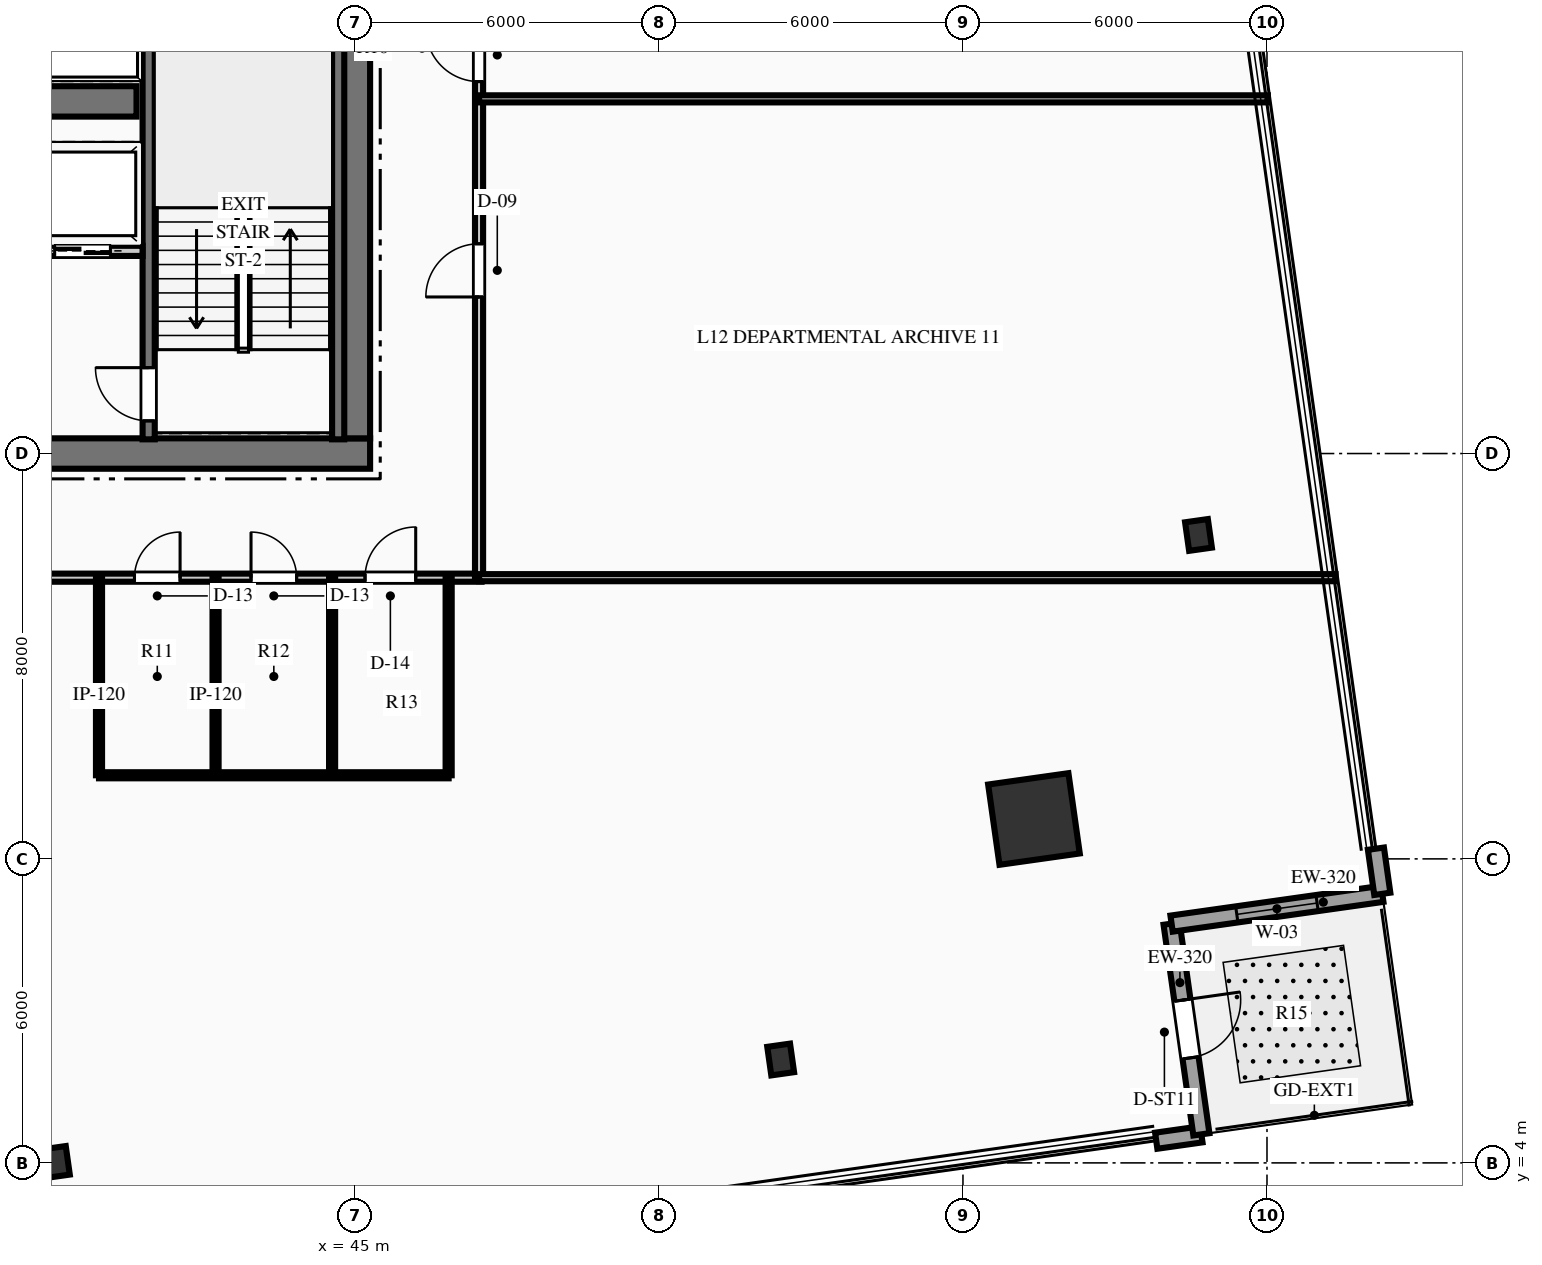
"""IFC4 building model, lengths in metres.
Left out: names, types, materials, properties, quantities, classifications, styles, units other than length and angle.
Written with IfcOpenShell. Run it as: python <this file> out.ifc"""

import sys

from ifc_helpers import new_model, si_unit, direction, frame, frame_2d, origin, origin_2d, place, context, subcontext, project, spatial, rectangle, hollow_rectangle, i_section, extrude, element, fill, save


model = new_model("IFC4")
c1 = context("Model", 3, precision=1e-05, world=origin(), true_north=direction((0.0, 1.0)))
c2 = subcontext(c1, "Body", "Model", "MODEL_VIEW")
j1 = project(units=[si_unit("LENGTHUNIT", "METRE"), si_unit("PLANEANGLEUNIT", "RADIAN")], contexts=[c1])
p1 = place(None, origin())
s1 = spatial("IfcSite", under=j1, at=p1, CompositionType="ELEMENT")
p2 = place(p1, origin())
s2 = spatial("IfcBuilding", under=s1, at=p2, CompositionType="ELEMENT")
p3 = place(p2, frame((0.0, 0.0, 55.2)))
s3 = spatial("IfcBuildingStorey", under=s2, at=p3, CompositionType="ELEMENT", Elevation=55.2)
p4 = place(p3, frame((26.7, 18.0, 0.0), z_axis=(0.0, 0.0, 1.0), x_axis=(1.0, 0.0, 0.0)))
e1 = element("IfcWall", 1, at=p4, inside=s3, PredefinedType="SHEAR", context=c2, shape_type="SweptSolid", body=[
    extrude(rectangle(XDim=18.6, YDim=0.6, at=frame_2d((9.3, 0.0))), origin(), (0.0, 0.0, 1.0), 3.75),
])
p5 = place(p4, frame((7.4, 0.0, 0.0)))
e2 = element("IfcOpeningElement", 2, at=p5, cuts=e1, PredefinedType="OPENING", context=c2, shape_type="SweptSolid", body=[
    extrude(rectangle(XDim=1.1, YDim=2.15, at=frame_2d((0.55, 1.075))), frame((0.0, 0.31, 0.0), z_axis=(0.0, -1.0, 0.0), x_axis=(1.0, 0.0, 0.0)), (0.0, 0.0, 1.0), 0.62),
])
p6 = place(p4, frame((10.1, 0.0, 0.0)))
e3 = element("IfcOpeningElement", 3, at=p6, cuts=e1, PredefinedType="OPENING", context=c2, shape_type="SweptSolid", body=[
    extrude(rectangle(XDim=1.1, YDim=2.15, at=frame_2d((0.55, 1.075))), frame((0.0, 0.31, 0.0), z_axis=(0.0, -1.0, 0.0), x_axis=(1.0, 0.0, 0.0)), (0.0, 0.0, 1.0), 0.62),
])
p7 = place(p3, frame((45.0, 18.3, 0.0), z_axis=(0.0, 0.0, 1.0), x_axis=(0.0, 1.0, 0.0)))
e4 = element("IfcWall", 4, at=p7, inside=s3, PredefinedType="SHEAR", context=c2, shape_type="SweptSolid", body=[
    extrude(rectangle(XDim=15.4, YDim=0.6, at=frame_2d((7.7, 0.0))), origin(), (0.0, 0.0, 1.0), 3.75),
])
p8 = place(p7, frame((9.94, 0.0, 0.0)))
e5 = element("IfcOpeningElement", 5, at=p8, cuts=e4, PredefinedType="OPENING", context=c2, shape_type="SweptSolid", body=[
    extrude(rectangle(XDim=1.4, YDim=2.2, at=frame_2d((0.7, 1.1))), frame((0.0, 0.31, 0.0), z_axis=(0.0, -1.0, 0.0), x_axis=(1.0, 0.0, 0.0)), (0.0, 0.0, 1.0), 0.62),
])
p9 = place(p3, frame((31.31, 24.95, 0.0), z_axis=(0.0, 0.0, 1.0), x_axis=(1.0, 0.0, 0.0)))
e6 = element("IfcWall", 6, at=p9, inside=s3, PredefinedType="SHEAR", context=c2, shape_type="SweptSolid", body=[
    extrude(rectangle(XDim=9.38, YDim=0.6, at=frame_2d((4.69, 0.0))), origin(), (0.0, 0.0, 1.0), 3.75),
])
p10 = place(p3, frame((40.93, 18.28, 0.0), z_axis=(0.0, 0.0, 1.0), x_axis=(0.0, 1.0, 0.0)))
e7 = element("IfcWall", 7, at=p10, inside=s3, PredefinedType="SHEAR", context=c2, shape_type="SweptSolid", body=[
    extrude(rectangle(XDim=8.26, YDim=0.24, at=frame_2d((4.13, 0.0))), origin(), (0.0, 0.0, 1.0), 3.75),
])
p11 = place(p10, frame((0.365, 0.0, 0.0)))
e8 = element("IfcOpeningElement", 8, at=p11, cuts=e7, PredefinedType="OPENING", context=c2, shape_type="SweptSolid", body=[
    extrude(rectangle(XDim=1.05, YDim=2.15, at=frame_2d((0.525, 1.075))), frame((0.0, 0.13, 0.0), z_axis=(0.0, -1.0, 0.0), x_axis=(1.0, 0.0, 0.0)), (0.0, 0.0, 1.0), 0.26),
])
p12 = place(p3, frame((44.67, 18.28, 0.0), z_axis=(0.0, 0.0, 1.0), x_axis=(0.0, 1.0, 0.0)))
e9 = element("IfcWall", 9, at=p12, inside=s3, PredefinedType="SHEAR", context=c2, shape_type="SweptSolid", body=[
    extrude(rectangle(XDim=8.26, YDim=0.24, at=frame_2d((4.13, 0.0))), origin(), (0.0, 0.0, 1.0), 3.75),
])
p13 = place(p3, frame((58.401, 10.787, 0.0), z_axis=(0.0, 0.0, 1.0), x_axis=(0.990146240249, 0.140037219771, 0.0)))
e10 = element("IfcColumn", 10, at=p13, inside=s3, PredefinedType="COLUMN", context=c2, shape_type="SweptSolid", body=[
    extrude(hollow_rectangle(XDim=1.6, YDim=1.6, WallThickness=0.08, at=origin_2d()), origin(), (0.0, 0.0, 1.0), 3.75),
])
for number, where, z_axis, x_axis in (
    (11, (39.109, 4.019, 0.0), (0.0, 0.0, 1.0), (0.99, 0.14, 0.0)),
    (12, (53.403, 6.04, 0.0), (0.0, 0.0, 1.0), (0.99, 0.14, 0.0)),
    (13, (61.648, 16.393, 0.0), (0.0, 0.0, 1.0), (0.99, 0.14, 0.0)),
):
    element("IfcColumn", number, at=place(p3, frame(where, z_axis=z_axis, x_axis=x_axis)), inside=s3, PredefinedType="COLUMN", context=c2, shape_type="SweptSolid", body=[
        extrude(i_section(OverallWidth=0.454, OverallDepth=0.569, WebThickness=0.078, FlangeThickness=0.125, at=origin_2d()), origin(), (0.0, 0.0, 1.0), 3.75),
    ])
p14 = place(p3, frame((61.705, 4.563, 0.0), z_axis=(0.0, 0.0, 1.0), x_axis=(-0.990149293409, -0.140015630419, 0.0)))
e14 = element("IfcWall", 14, at=p14, inside=s3, PredefinedType="STANDARD", context=c2, shape_type="SweptSolid", body=[
    extrude(rectangle(XDim=0.9, YDim=0.32, at=frame_2d((0.45, 0.0))), origin(), (0.0, 0.0, 1.0), 3.44),
])
p15 = place(p3, frame((61.117, 8.722, 0.0), z_axis=(0.0, 0.0, 1.0), x_axis=(0.139972650661, -0.990155370165, 0.0)))
e15 = element("IfcWall", 15, at=p15, inside=s3, PredefinedType="STANDARD", context=c2, shape_type="SweptSolid", body=[
    extrude(rectangle(XDim=4.2, YDim=0.32, at=frame_2d((2.1, 0.0))), origin(), (0.0, 0.0, 1.0), 3.44),
])
p16 = place(p15, frame((1.525, 0.0, 0.0)))
e16 = element("IfcOpeningElement", 16, at=p16, cuts=e15, PredefinedType="OPENING", context=c2, shape_type="SweptSolid", body=[
    extrude(rectangle(XDim=1.15, YDim=2.2, at=frame_2d((0.575, 1.1))), frame((0.0, 0.17, 0.0), z_axis=(0.0, -1.0, 0.0), x_axis=(1.0, 0.0, 0.0)), (0.0, 0.0, 1.0), 0.34),
])
p17 = place(p3, frame((65.276, 9.31, 0.0), z_axis=(0.0, 0.0, 1.0), x_axis=(-0.990146172451, -0.140037699139, 0.0)))
e17 = element("IfcWall", 17, at=p17, inside=s3, PredefinedType="STANDARD", context=c2, shape_type="SweptSolid", body=[
    extrude(rectangle(XDim=4.2, YDim=0.32, at=frame_2d((2.1, 0.0))), origin(), (0.0, 0.0, 1.0), 3.44),
])
p18 = place(p17, frame((1.3, 0.0, 0.85)))
e18 = element("IfcOpeningElement", 18, at=p18, cuts=e17, PredefinedType="OPENING", context=c2, shape_type="SweptSolid", body=[
    extrude(rectangle(XDim=1.6, YDim=2.1, at=frame_2d((0.8, 1.05))), frame((0.0, 0.17, 0.0), z_axis=(0.0, -1.0, 0.0), x_axis=(1.0, 0.0, 0.0)), (0.0, 0.0, 1.0), 0.34),
])
p19 = place(p3, frame((65.15, 10.201, 0.0), z_axis=(0.0, 0.0, 1.0), x_axis=(0.139978021702, -0.990154610877, 0.0)))
e19 = element("IfcWall", 19, at=p19, inside=s3, PredefinedType="STANDARD", context=c2, shape_type="SweptSolid", body=[
    extrude(rectangle(XDim=0.9, YDim=0.32, at=frame_2d((0.45, 0.0))), origin(), (0.0, 0.0, 1.0), 3.44),
])
p20 = place(p3, frame((36.12, 22.0, 0.0), z_axis=(0.0, 0.0, 1.0), x_axis=(1.0, 0.0, 0.0)))
e20 = element("IfcWall", 20, at=p20, inside=s3, PredefinedType="PARTITIONING", context=c2, shape_type="SweptSolid", body=[
    extrude(rectangle(XDim=4.69, YDim=0.2, at=frame_2d((2.345, 0.0))), origin(), (0.0, 0.0, 1.0), 3.44),
])
p21 = place(p20, frame((2.955, 0.0, 0.0)))
e21 = element("IfcOpeningElement", 21, at=p21, cuts=e20, PredefinedType="OPENING", context=c2, shape_type="SweptSolid", body=[
    extrude(rectangle(XDim=1.1, YDim=2.15, at=frame_2d((0.55, 1.075))), frame((0.0, 0.11, 0.0), z_axis=(0.0, -1.0, 0.0), x_axis=(1.0, 0.0, 0.0)), (0.0, 0.0, 1.0), 0.22),
])
p22 = place(p20, frame((0.08, 0.0, 0.0)))
e22 = element("IfcOpeningElement", 22, at=p22, cuts=e20, PredefinedType="OPENING", context=c2, shape_type="SweptSolid", body=[
    extrude(rectangle(XDim=1.4, YDim=2.2, at=frame_2d((0.7, 1.1))), frame((0.0, 0.11, 0.0), z_axis=(0.0, -1.0, 0.0), x_axis=(1.0, 0.0, 0.0)), (0.0, 0.0, 1.0), 0.22),
])
p23 = place(p3, frame((24.5, 15.55, 0.0), z_axis=(0.0, 0.0, 1.0), x_axis=(1.0, 0.0, 0.0)))
e23 = element("IfcWall", 23, at=p23, inside=s3, PredefinedType="PARTITIONING", context=c2, shape_type="SweptSolid", body=[
    extrude(rectangle(XDim=23.0, YDim=0.16, at=frame_2d((11.5, 0.0))), origin(), (0.0, 0.0, 1.0), 3.44),
])
p24 = place(p23, frame((16.15, 0.0, 0.0)))
e24 = element("IfcOpeningElement", 24, at=p24, cuts=e23, PredefinedType="OPENING", context=c2, shape_type="SweptSolid", body=[
    extrude(rectangle(XDim=0.9, YDim=2.15, at=frame_2d((0.45, 1.075))), frame((0.0, 0.09, 0.0), z_axis=(0.0, -1.0, 0.0), x_axis=(1.0, 0.0, 0.0)), (0.0, 0.0, 1.0), 0.18),
])
p25 = place(p23, frame((18.45, 0.0, 0.0)))
e25 = element("IfcOpeningElement", 25, at=p25, cuts=e23, PredefinedType="OPENING", context=c2, shape_type="SweptSolid", body=[
    extrude(rectangle(XDim=0.9, YDim=2.15, at=frame_2d((0.45, 1.075))), frame((0.0, 0.09, 0.0), z_axis=(0.0, -1.0, 0.0), x_axis=(1.0, 0.0, 0.0)), (0.0, 0.0, 1.0), 0.18),
])
p26 = place(p23, frame((20.7, 0.0, 0.0)))
e26 = element("IfcOpeningElement", 26, at=p26, cuts=e23, PredefinedType="OPENING", context=c2, shape_type="SweptSolid", body=[
    extrude(rectangle(XDim=1.0, YDim=2.15, at=frame_2d((0.5, 1.075))), frame((0.0, 0.09, 0.0), z_axis=(0.0, -1.0, 0.0), x_axis=(1.0, 0.0, 0.0)), (0.0, 0.0, 1.0), 0.18),
])
p27 = place(p23, frame((1.67, 0.0, 0.0)))
e27 = element("IfcOpeningElement", 27, at=p27, cuts=e23, PredefinedType="OPENING", context=c2, shape_type="SweptSolid", body=[
    extrude(rectangle(XDim=1.05, YDim=2.15, at=frame_2d((0.525, 1.075))), frame((0.0, 0.09, 0.0), z_axis=(0.0, -1.0, 0.0), x_axis=(1.0, 0.0, 0.0)), (0.0, 0.0, 1.0), 0.18),
])
p28 = place(p23, frame((6.333, 0.0, 0.0)))
e28 = element("IfcOpeningElement", 28, at=p28, cuts=e23, PredefinedType="OPENING", context=c2, shape_type="SweptSolid", body=[
    extrude(rectangle(XDim=1.05, YDim=2.15, at=frame_2d((0.525, 1.075))), frame((0.0, 0.09, 0.0), z_axis=(0.0, -1.0, 0.0), x_axis=(1.0, 0.0, 0.0)), (0.0, 0.0, 1.0), 0.18),
])
p29 = place(p3, frame((47.45, 15.55, 0.0), z_axis=(0.0, 0.0, 1.0), x_axis=(0.0, 1.0, 0.0)))
e29 = element("IfcWall", 29, at=p29, inside=s3, PredefinedType="PARTITIONING", context=c2, shape_type="SweptSolid", body=[
    extrude(rectangle(XDim=20.9, YDim=0.16, at=frame_2d((10.45, 0.0))), origin(), (0.0, 0.0, 1.0), 3.44),
])
p30 = place(p29, frame((14.975, 0.0, 0.0)))
e30 = element("IfcOpeningElement", 30, at=p30, cuts=e29, PredefinedType="OPENING", context=c2, shape_type="SweptSolid", body=[
    extrude(rectangle(XDim=0.95, YDim=2.15, at=frame_2d((0.475, 1.075))), frame((0.0, 0.09, 0.0), z_axis=(0.0, -1.0, 0.0), x_axis=(1.0, 0.0, 0.0)), (0.0, 0.0, 1.0), 0.18),
])
p31 = place(p29, frame((5.54, 0.0, 0.0)))
e31 = element("IfcOpeningElement", 31, at=p31, cuts=e29, PredefinedType="OPENING", context=c2, shape_type="SweptSolid", body=[
    extrude(rectangle(XDim=1.05, YDim=2.15, at=frame_2d((0.525, 1.075))), frame((0.0, 0.09, 0.0), z_axis=(0.0, -1.0, 0.0), x_axis=(1.0, 0.0, 0.0)), (0.0, 0.0, 1.0), 0.18),
])
p32 = place(p29, frame((9.791, 0.0, 0.0)))
e32 = element("IfcOpeningElement", 32, at=p32, cuts=e29, PredefinedType="OPENING", context=c2, shape_type="SweptSolid", body=[
    extrude(rectangle(XDim=1.05, YDim=2.15, at=frame_2d((0.525, 1.075))), frame((0.0, 0.09, 0.0), z_axis=(0.0, -1.0, 0.0), x_axis=(1.0, 0.0, 0.0)), (0.0, 0.0, 1.0), 0.18),
])
for number, where, z_axis, x_axis in (
    (33, (39.95, 11.65, 0.0), (0.0, 0.0, 1.0), (0.0, 1.0, 0.0)),
    (34, (42.25, 11.65, 0.0), (0.0, 0.0, 1.0), (0.0, 1.0, 0.0)),
    (35, (44.55, 11.65, 0.0), (0.0, 0.0, 1.0), (0.0, 1.0, 0.0)),
    (36, (46.85, 11.65, 0.0), (0.0, 0.0, 1.0), (0.0, 1.0, 0.0)),
):
    element("IfcWall", number, at=place(p3, frame(where, z_axis=z_axis, x_axis=x_axis)), inside=s3, PredefinedType="PARTITIONING", context=c2, shape_type="SweptSolid", body=[
        extrude(rectangle(XDim=3.9, YDim=0.12, at=frame_2d((1.95, 0.0))), origin(), (0.0, 0.0, 1.0), 3.44),
    ])
p33 = place(p3, frame((39.95, 11.65, 0.0), z_axis=(0.0, 0.0, 1.0), x_axis=(1.0, 0.0, 0.0)))
e37 = element("IfcWall", 37, at=p33, inside=s3, PredefinedType="PARTITIONING", context=c2, shape_type="SweptSolid", body=[
    extrude(rectangle(XDim=6.9, YDim=0.12, at=frame_2d((3.45, 0.0))), origin(), (0.0, 0.0, 1.0), 3.44),
])
p34 = place(p3, frame((47.45, 15.55, 0.0), z_axis=(0.0, 0.0, 1.0), x_axis=(1.0, 0.0, 0.0)))
e38 = element("IfcWall", 38, at=p34, inside=s3, PredefinedType="PARTITIONING", context=c2, shape_type="SweptSolid", body=[
    extrude(rectangle(XDim=16.903, YDim=0.14, at=frame_2d((8.451, 0.0))), origin(), (0.0, 0.0, 1.0), 3.44),
])
p35 = place(p3, frame((47.45, 25.0, 0.0), z_axis=(0.0, 0.0, 1.0), x_axis=(1.0, 0.0, 0.0)))
e39 = element("IfcWall", 39, at=p35, inside=s3, PredefinedType="PARTITIONING", context=c2, shape_type="SweptSolid", body=[
    extrude(rectangle(XDim=15.566, YDim=0.14, at=frame_2d((7.783, 0.0))), origin(), (0.0, 0.0, 1.0), 3.44),
])
p36 = place(p16, origin())
e40 = element("IfcDoor", 40, at=p36, inside=s3, OperationType="SINGLE_SWING_LEFT", PredefinedType="DOOR", context=c2, shape_type="SweptSolid", body=[
    extrude(rectangle(XDim=1.15, YDim=2.2, at=frame_2d((0.575, 1.1))), frame((0.0, 0.025, 0.0), z_axis=(0.0, -1.0, 0.0), x_axis=(1.0, 0.0, 0.0)), (0.0, 0.0, 1.0), 0.05),
])
fill(e16, e40)
p37 = place(p18, origin())
e41 = element("IfcWindow", 41, at=p37, inside=s3, PartitioningType="SINGLE_PANEL", PredefinedType="WINDOW", context=c2, shape_type="SweptSolid", body=[
    extrude(rectangle(XDim=1.6, YDim=2.1, at=frame_2d((0.8, 1.05))), frame((0.0, 0.03, 0.0), z_axis=(0.0, -1.0, 0.0), x_axis=(1.0, 0.0, 0.0)), (0.0, 0.0, 1.0), 0.06),
])
fill(e18, e41)
p38 = place(p11, origin())
e42 = element("IfcDoor", 42, at=p38, inside=s3, OperationType="SINGLE_SWING_RIGHT", PredefinedType="DOOR", context=c2, shape_type="SweptSolid", body=[
    extrude(rectangle(XDim=1.05, YDim=2.15, at=frame_2d((0.525, 1.075))), frame((0.0, 0.025, 0.0), z_axis=(0.0, -1.0, 0.0), x_axis=(1.0, 0.0, 0.0)), (0.0, 0.0, 1.0), 0.05),
])
fill(e8, e42)
p39 = place(p24, origin())
e43 = element("IfcDoor", 43, at=p39, inside=s3, OperationType="SINGLE_SWING_RIGHT", PredefinedType="DOOR", context=c2, shape_type="SweptSolid", body=[
    extrude(rectangle(XDim=0.9, YDim=2.15, at=frame_2d((0.45, 1.075))), frame((0.0, 0.025, 0.0), z_axis=(0.0, -1.0, 0.0), x_axis=(1.0, 0.0, 0.0)), (0.0, 0.0, 1.0), 0.05),
])
fill(e24, e43)
p40 = place(p25, origin())
e44 = element("IfcDoor", 44, at=p40, inside=s3, OperationType="SINGLE_SWING_LEFT", PredefinedType="DOOR", context=c2, shape_type="SweptSolid", body=[
    extrude(rectangle(XDim=0.9, YDim=2.15, at=frame_2d((0.45, 1.075))), frame((0.0, 0.025, 0.0), z_axis=(0.0, -1.0, 0.0), x_axis=(1.0, 0.0, 0.0)), (0.0, 0.0, 1.0), 0.05),
])
fill(e25, e44)
p41 = place(p26, origin())
e45 = element("IfcDoor", 45, at=p41, inside=s3, OperationType="SINGLE_SWING_RIGHT", PredefinedType="DOOR", context=c2, shape_type="SweptSolid", body=[
    extrude(rectangle(XDim=1.0, YDim=2.15, at=frame_2d((0.5, 1.075))), frame((0.0, 0.025, 0.0), z_axis=(0.0, -1.0, 0.0), x_axis=(1.0, 0.0, 0.0)), (0.0, 0.0, 1.0), 0.05),
])
fill(e26, e45)
p42 = place(p31, origin())
e46 = element("IfcDoor", 46, at=p42, inside=s3, OperationType="SINGLE_SWING_LEFT", PredefinedType="DOOR", context=c2, shape_type="SweptSolid", body=[
    extrude(rectangle(XDim=1.05, YDim=2.15, at=frame_2d((0.525, 1.075))), frame((0.0, 0.025, 0.0), z_axis=(0.0, -1.0, 0.0), x_axis=(1.0, 0.0, 0.0)), (0.0, 0.0, 1.0), 0.05),
])
fill(e31, e46)
p43 = place(p32, origin())
e47 = element("IfcDoor", 47, at=p43, inside=s3, OperationType="SINGLE_SWING_RIGHT", PredefinedType="DOOR", context=c2, shape_type="SweptSolid", body=[
    extrude(rectangle(XDim=1.05, YDim=2.15, at=frame_2d((0.525, 1.075))), frame((0.0, 0.025, 0.0), z_axis=(0.0, -1.0, 0.0), x_axis=(1.0, 0.0, 0.0)), (0.0, 0.0, 1.0), 0.05),
])
fill(e32, e47)
p44 = place(p21, origin())
e48 = element("IfcDoor", 48, at=p44, inside=s3, OperationType="SLIDING_TO_LEFT", PredefinedType="DOOR", context=c2, shape_type="SweptSolid", body=[
    extrude(rectangle(XDim=1.1, YDim=2.15, at=frame_2d((0.55, 1.075))), frame((0.0, 0.025, 0.0), z_axis=(0.0, -1.0, 0.0), x_axis=(1.0, 0.0, 0.0)), (0.0, 0.0, 1.0), 0.05),
])
fill(e21, e48)
save(model, sys.argv[1])
